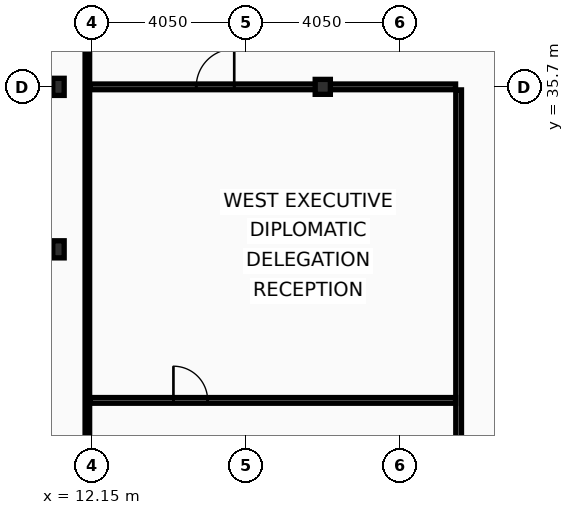
"""IFC4 building model, lengths in metres.
Left out: names, types, materials, properties, quantities, classifications, styles, units other than length and angle.
Written with IfcOpenShell. Run it as: python <this file> out.ifc"""

import sys

from ifc_helpers import new_model, si_unit, direction, frame, frame_2d, origin, origin_2d, place, context, subcontext, project, spatial, rectangle, i_section, extrude, element, fill, save


model = new_model("IFC4")
c1 = context("Model", 3, precision=1e-05, world=origin(), true_north=direction((0.0, 1.0)))
c2 = subcontext(c1, "Body", "Model", "MODEL_VIEW")
j1 = project(units=[si_unit("LENGTHUNIT", "METRE"), si_unit("PLANEANGLEUNIT", "RADIAN")], contexts=[c1])
p1 = place(None, origin())
s1 = spatial("IfcSite", under=j1, at=p1, CompositionType="ELEMENT")
p2 = place(p1, origin())
s2 = spatial("IfcBuilding", under=s1, at=p2, CompositionType="ELEMENT")
p3 = place(p2, frame((0.0, 0.0, 321.8)))
s3 = spatial("IfcBuildingStorey", under=s2, at=p3, CompositionType="ELEMENT", Elevation=321.8)
for number, where, z_axis, x_axis in (
    (1, (11.27, 31.425, 0.0), (0.0, 0.0, 1.0), (1.0, 0.0, 0.0)),
    (2, (11.27, 35.7, 0.0), (0.0, 0.0, 1.0), (1.0, 0.0, 0.0)),
):
    element("IfcColumn", number, at=place(p3, frame(where, z_axis=z_axis, x_axis=x_axis)), inside=s3, PredefinedType="COLUMN", context=c2, shape_type="SweptSolid", body=[
        extrude(i_section(OverallWidth=0.3, OverallDepth=0.45, WebThickness=0.014, FlangeThickness=0.026, at=origin_2d()), origin(), (0.0, 0.0, 1.0), 3.6),
    ])
p4 = place(p3, frame((18.225, 35.7, 0.0), z_axis=(0.0, 0.0, 1.0), x_axis=(1.0, 0.0, 0.0)))
e3 = element("IfcColumn", 3, at=p4, inside=s3, PredefinedType="COLUMN", context=c2, shape_type="SweptSolid", body=[
    extrude(i_section(OverallWidth=0.399, OverallDepth=0.393, WebThickness=0.023, FlangeThickness=0.037, at=origin_2d()), origin(), (0.0, 0.0, 1.0), 3.6),
])
p5 = place(p3, frame((21.8, 10.665, 0.0), z_axis=(0.0, 0.0, 1.0), x_axis=(0.0, 1.0, 0.0)))
e4 = element("IfcWall", 4, at=p5, inside=s3, PredefinedType="PARTITIONING", context=c2, shape_type="SweptSolid", body=[
    extrude(rectangle(XDim=24.955, YDim=0.15, at=frame_2d((12.478, 0.0))), origin(), (0.0, 0.0, 1.0), 3.07),
])
p6 = place(p5, frame((4.2, 0.0, 0.0)))
e5 = element("IfcOpeningElement", 5, at=p6, cuts=e4, PredefinedType="OPENING", context=c2, shape_type="SweptSolid", body=[
    extrude(rectangle(XDim=1.1, YDim=2.1, at=frame_2d((0.55, 1.05))), frame((0.0, 0.085, 0.0), z_axis=(0.0, -1.0, 0.0), x_axis=(1.0, 0.0, 0.0)), (0.0, 0.0, 1.0), 0.17),
])
p7 = place(p3, frame((12.095, 35.7, 0.0), z_axis=(0.0, 0.0, 1.0), x_axis=(1.0, 0.0, 0.0)))
e6 = element("IfcWall", 6, at=p7, inside=s3, PredefinedType="PARTITIONING", context=c2, shape_type="SweptSolid", body=[
    extrude(rectangle(XDim=9.625, YDim=0.15, at=frame_2d((4.812, 0.0))), origin(), (0.0, 0.0, 1.0), 2.83),
])
p8 = place(p7, frame((2.8, 0.0, 0.0)))
e7 = element("IfcOpeningElement", 7, at=p8, cuts=e6, PredefinedType="OPENING", context=c2, shape_type="SweptSolid", body=[
    extrude(rectangle(XDim=1.0, YDim=2.05, at=frame_2d((0.5, 1.025))), frame((0.0, 0.085, 0.0), z_axis=(0.0, -1.0, 0.0), x_axis=(1.0, 0.0, 0.0)), (0.0, 0.0, 1.0), 0.17),
])
p9 = place(p3, frame((12.095, 27.45, 0.0), z_axis=(0.0, 0.0, 1.0), x_axis=(1.0, 0.0, 0.0)))
e8 = element("IfcWall", 8, at=p9, inside=s3, PredefinedType="PARTITIONING", context=c2, shape_type="SweptSolid", body=[
    extrude(rectangle(XDim=9.625, YDim=0.15, at=frame_2d((4.812, 0.0))), origin(), (0.0, 0.0, 1.0), 2.83),
])
p10 = place(p9, frame((2.2, 0.0, 0.0)))
e9 = element("IfcOpeningElement", 9, at=p10, cuts=e8, PredefinedType="OPENING", context=c2, shape_type="SweptSolid", body=[
    extrude(rectangle(XDim=0.9, YDim=2.05, at=frame_2d((0.45, 1.025))), frame((0.0, 0.085, 0.0), z_axis=(0.0, -1.0, 0.0), x_axis=(1.0, 0.0, 0.0)), (0.0, 0.0, 1.0), 0.17),
])
p11 = place(p3, frame((12.03, 10.665, 0.0), z_axis=(0.0, 0.0, 1.0), x_axis=(0.0, 1.0, 0.0)))
e10 = element("IfcWall", 10, at=p11, inside=s3, PredefinedType="PARTITIONING", context=c2, shape_type="SweptSolid", body=[
    extrude(rectangle(XDim=42.11, YDim=0.12, at=frame_2d((21.055, 0.0))), origin(), (0.0, 0.0, 1.0), 2.83),
])
p12 = place(p8, origin())
e11 = element("IfcDoor", 11, at=p12, inside=s3, OperationType="SINGLE_SWING_RIGHT", PredefinedType="DOOR", context=c2, shape_type="SweptSolid", body=[
    extrude(rectangle(XDim=1.0, YDim=2.05, at=frame_2d((0.5, 1.025))), frame((0.0, 0.025, 0.0), z_axis=(0.0, -1.0, 0.0), x_axis=(1.0, 0.0, 0.0)), (0.0, 0.0, 1.0), 0.05),
])
fill(e7, e11)
p13 = place(p10, origin())
e12 = element("IfcDoor", 12, at=p13, inside=s3, OperationType="SINGLE_SWING_LEFT", PredefinedType="DOOR", context=c2, shape_type="SweptSolid", body=[
    extrude(rectangle(XDim=0.9, YDim=2.05, at=frame_2d((0.45, 1.025))), frame((0.0, 0.025, 0.0), z_axis=(0.0, -1.0, 0.0), x_axis=(1.0, 0.0, 0.0)), (0.0, 0.0, 1.0), 0.05),
])
fill(e9, e12)
save(model, sys.argv[1])
